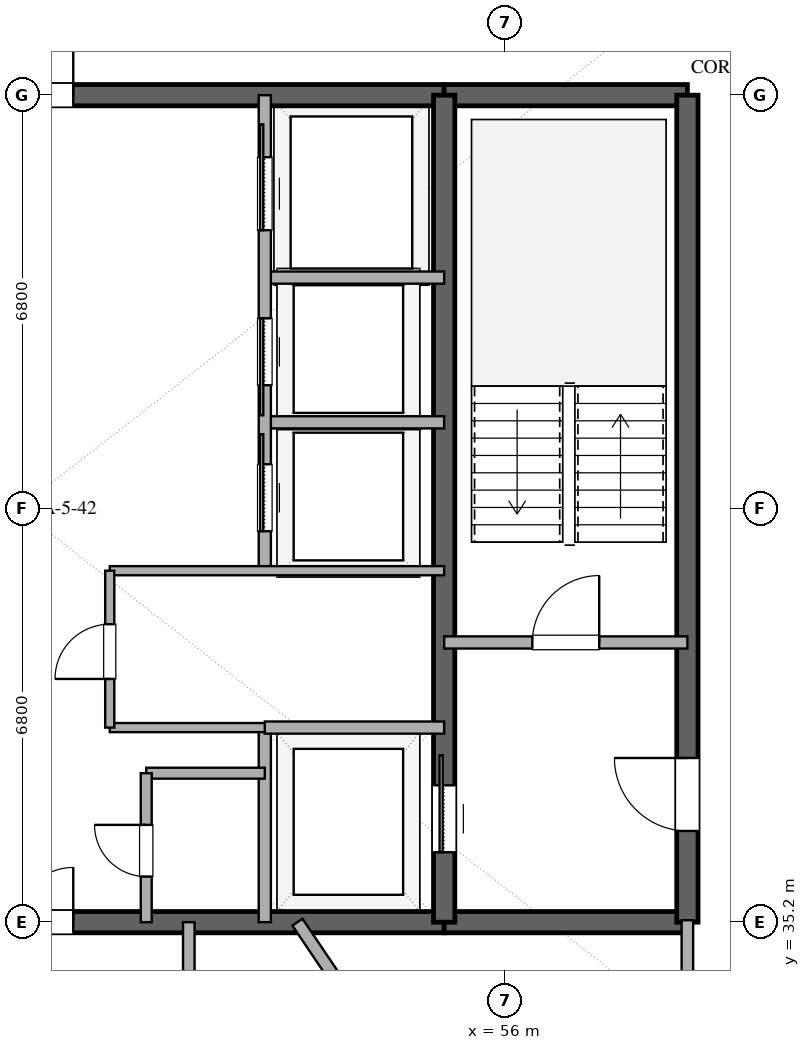
"""IFC4 building model, lengths in metres.
Left out: names, types, materials, properties, quantities, classifications, styles, units other than length and angle.
Written with IfcOpenShell. Run it as: python <this file> out.ifc"""

import sys

from ifc_helpers import new_model, si_unit, direction, frame, frame_2d, origin, place, context, subcontext, project, spatial, rectangle, extrude, element, fill, save


model = new_model("IFC4")
c1 = context("Model", 3, precision=1e-05, world=origin(), true_north=direction((0.0, 1.0)))
c2 = subcontext(c1, "Body", "Model", "MODEL_VIEW")
j1 = project(units=[si_unit("LENGTHUNIT", "METRE"), si_unit("PLANEANGLEUNIT", "RADIAN")], contexts=[c1])
p1 = place(None, origin())
s1 = spatial("IfcSite", under=j1, at=p1, CompositionType="ELEMENT")
p2 = place(p1, origin())
s2 = spatial("IfcBuilding", under=s1, at=p2, CompositionType="ELEMENT")
p3 = place(p2, frame((0.0, 0.0, 287.4)))
s3 = spatial("IfcBuildingStorey", under=s2, at=p3, CompositionType="ELEMENT", Elevation=287.4)
p4 = place(p3, frame((41.0, 35.2, 0.0), z_axis=(0.0, 0.0, 1.0), x_axis=(1.0, 0.0, 0.0)))
e1 = element("IfcWall", 1, at=p4, inside=s3, PredefinedType="SHEAR", context=c2, shape_type="SweptSolid", body=[
    extrude(rectangle(XDim=14.0, YDim=0.35, at=frame_2d((7.0, 0.0))), origin(), (0.0, 0.0, 1.0), 3.37),
])
p5 = place(p4, frame((6.1, 0.0, 0.0)))
e2 = element("IfcOpeningElement", 2, at=p5, cuts=e1, PredefinedType="OPENING", context=c2, shape_type="SweptSolid", body=[
    extrude(rectangle(XDim=1.8, YDim=2.25, at=frame_2d((0.9, 1.125))), frame((0.0, 0.185, 0.0), z_axis=(0.0, -1.0, 0.0), x_axis=(1.0, 0.0, 0.0)), (0.0, 0.0, 1.0), 0.37),
])
p6 = place(p3, frame((55.0, 35.2, 0.0), z_axis=(0.0, 0.0, 1.0), x_axis=(1.0, 0.0, 0.0)))
e3 = element("IfcWall", 3, at=p6, inside=s3, PredefinedType="SHEAR", context=c2, shape_type="SweptSolid", body=[
    extrude(rectangle(XDim=4.0, YDim=0.35, at=frame_2d((2.0, 0.0))), origin(), (0.0, 0.0, 1.0), 3.37),
])
p7 = place(p3, frame((41.0, 48.8, 0.0), z_axis=(0.0, 0.0, 1.0), x_axis=(1.0, 0.0, 0.0)))
e4 = element("IfcWall", 4, at=p7, inside=s3, PredefinedType="SHEAR", context=c2, shape_type="SweptSolid", body=[
    extrude(rectangle(XDim=14.0, YDim=0.35, at=frame_2d((7.0, 0.0))), origin(), (0.0, 0.0, 1.0), 3.37),
])
p8 = place(p7, frame((6.1, 0.0, 0.0)))
e5 = element("IfcOpeningElement", 5, at=p8, cuts=e4, PredefinedType="OPENING", context=c2, shape_type="SweptSolid", body=[
    extrude(rectangle(XDim=1.8, YDim=2.25, at=frame_2d((0.9, 1.125))), frame((0.0, 0.185, 0.0), z_axis=(0.0, -1.0, 0.0), x_axis=(1.0, 0.0, 0.0)), (0.0, 0.0, 1.0), 0.37),
])
p9 = place(p3, frame((55.0, 48.8, 0.0), z_axis=(0.0, 0.0, 1.0), x_axis=(1.0, 0.0, 0.0)))
e6 = element("IfcWall", 6, at=p9, inside=s3, PredefinedType="SHEAR", context=c2, shape_type="SweptSolid", body=[
    extrude(rectangle(XDim=4.0, YDim=0.35, at=frame_2d((2.0, 0.0))), origin(), (0.0, 0.0, 1.0), 3.37),
])
p10 = place(p3, frame((59.0, 35.2, 0.0), z_axis=(0.0, 0.0, 1.0), x_axis=(0.0, 1.0, 0.0)))
e7 = element("IfcWall", 7, at=p10, inside=s3, PredefinedType="SHEAR", context=c2, shape_type="SweptSolid", body=[
    extrude(rectangle(XDim=13.6, YDim=0.35, at=frame_2d((6.8, 0.0))), origin(), (0.0, 0.0, 1.0), 3.37),
])
p11 = place(p10, frame((1.5, 0.0, 0.0)))
e8 = element("IfcOpeningElement", 8, at=p11, cuts=e7, PredefinedType="OPENING", context=c2, shape_type="SweptSolid", body=[
    extrude(rectangle(XDim=1.2, YDim=2.15, at=frame_2d((0.6, 1.075))), frame((0.0, 0.185, 0.0), z_axis=(0.0, -1.0, 0.0), x_axis=(1.0, 0.0, 0.0)), (0.0, 0.0, 1.0), 0.37),
])
p12 = place(p3, frame((55.0, 35.2, 0.0), z_axis=(0.0, 0.0, 1.0), x_axis=(0.0, 1.0, 0.0)))
e9 = element("IfcWall", 9, at=p12, inside=s3, PredefinedType="SHEAR", context=c2, shape_type="SweptSolid", body=[
    extrude(rectangle(XDim=13.6, YDim=0.35, at=frame_2d((6.8, 0.0))), origin(), (0.0, 0.0, 1.0), 3.37),
])
p13 = place(p12, frame((1.15, 0.0, 0.0)))
e10 = element("IfcOpeningElement", 10, at=p13, cuts=e9, PredefinedType="OPENING", context=c2, shape_type="SweptSolid", body=[
    extrude(rectangle(XDim=1.1, YDim=2.2, at=frame_2d((0.55, 1.1))), frame((0.0, 0.185, 0.0), z_axis=(0.0, -1.0, 0.0), x_axis=(1.0, 0.0, 0.0)), (0.0, 0.0, 1.0), 0.37),
])
p14 = place(p3, frame((55.0, 39.8, 0.0), z_axis=(0.0, 0.0, 1.0), x_axis=(1.0, 0.0, 0.0)))
e11 = element("IfcWall", 11, at=p14, inside=s3, PredefinedType="SOLIDWALL", context=c2, shape_type="SweptSolid", body=[
    extrude(rectangle(XDim=4.0, YDim=0.2, at=frame_2d((2.0, 0.0))), origin(), (0.0, 0.0, 1.0), 2.73),
])
p15 = place(p14, frame((1.45, 0.0, 0.0)))
e12 = element("IfcOpeningElement", 12, at=p15, cuts=e11, PredefinedType="OPENING", context=c2, shape_type="SweptSolid", body=[
    extrude(rectangle(XDim=1.1, YDim=2.15, at=frame_2d((0.55, 1.075))), frame((0.0, 0.11, 0.0), z_axis=(0.0, -1.0, 0.0), x_axis=(1.0, 0.0, 0.0)), (0.0, 0.0, 1.0), 0.22),
])
p16 = place(p3, frame((52.05, 35.2, 0.0), z_axis=(0.0, 0.0, 1.0), x_axis=(0.0, 1.0, 0.0)))
e13 = element("IfcWall", 13, at=p16, inside=s3, PredefinedType="SOLIDWALL", context=c2, shape_type="SweptSolid", body=[
    extrude(rectangle(XDim=3.2, YDim=0.2, at=frame_2d((1.6, 0.0))), origin(), (0.0, 0.0, 1.0), 2.73),
])
for number, where, z_axis, x_axis in (
    (14, (52.05, 38.4, 0.0), (0.0, 0.0, 1.0), (1.0, 0.0, 0.0)),
    (15, (52.05, 43.42, 0.0), (0.0, 0.0, 1.0), (1.0, 0.0, 0.0)),
    (16, (52.05, 45.8, 0.0), (0.0, 0.0, 1.0), (1.0, 0.0, 0.0)),
):
    element("IfcWall", number, at=place(p3, frame(where, z_axis=z_axis, x_axis=x_axis)), inside=s3, PredefinedType="SOLIDWALL", context=c2, shape_type="SweptSolid", body=[
        extrude(rectangle(XDim=2.95, YDim=0.2, at=frame_2d((1.475, 0.0))), origin(), (0.0, 0.0, 1.0), 2.73),
    ])
p17 = place(p3, frame((52.05, 40.98, 0.0), z_axis=(0.0, 0.0, 1.0), x_axis=(0.0, 1.0, 0.0)))
e17 = element("IfcWall", 17, at=p17, inside=s3, PredefinedType="SOLIDWALL", context=c2, shape_type="SweptSolid", body=[
    extrude(rectangle(XDim=7.82, YDim=0.2, at=frame_2d((3.91, 0.0))), origin(), (0.0, 0.0, 1.0), 2.73),
])
p18 = place(p17, frame((0.65, 0.0, 0.0)))
e18 = element("IfcOpeningElement", 18, at=p18, cuts=e17, PredefinedType="OPENING", context=c2, shape_type="SweptSolid", body=[
    extrude(rectangle(XDim=1.1, YDim=2.2, at=frame_2d((0.55, 1.1))), frame((0.0, 0.11, 0.0), z_axis=(0.0, -1.0, 0.0), x_axis=(1.0, 0.0, 0.0)), (0.0, 0.0, 1.0), 0.22),
])
p19 = place(p17, frame((3.05, 0.0, 0.0)))
e19 = element("IfcOpeningElement", 19, at=p19, cuts=e17, PredefinedType="OPENING", context=c2, shape_type="SweptSolid", body=[
    extrude(rectangle(XDim=1.1, YDim=2.2, at=frame_2d((0.55, 1.1))), frame((0.0, 0.11, 0.0), z_axis=(0.0, -1.0, 0.0), x_axis=(1.0, 0.0, 0.0)), (0.0, 0.0, 1.0), 0.22),
])
p20 = place(p17, frame((5.6, 0.0, 0.0)))
e20 = element("IfcOpeningElement", 20, at=p20, cuts=e17, PredefinedType="OPENING", context=c2, shape_type="SweptSolid", body=[
    extrude(rectangle(XDim=1.2, YDim=2.2, at=frame_2d((0.6, 1.1))), frame((0.0, 0.11, 0.0), z_axis=(0.0, -1.0, 0.0), x_axis=(1.0, 0.0, 0.0)), (0.0, 0.0, 1.0), 0.22),
])
p21 = place(p3, frame((49.5, 40.98, 0.0), z_axis=(0.0, 0.0, 1.0), x_axis=(1.0, 0.0, 0.0)))
e21 = element("IfcWall", 21, at=p21, inside=s3, PredefinedType="PARTITIONING", context=c2, shape_type="SweptSolid", body=[
    extrude(rectangle(XDim=5.5, YDim=0.15, at=frame_2d((2.75, 0.0))), origin(), (0.0, 0.0, 1.0), 2.73),
])
p22 = place(p3, frame((49.5, 38.4, 0.0), z_axis=(0.0, 0.0, 1.0), x_axis=(1.0, 0.0, 0.0)))
e22 = element("IfcWall", 22, at=p22, inside=s3, PredefinedType="PARTITIONING", context=c2, shape_type="SweptSolid", body=[
    extrude(rectangle(XDim=2.55, YDim=0.15, at=frame_2d((1.275, 0.0))), origin(), (0.0, 0.0, 1.0), 2.73),
])
p23 = place(p3, frame((49.5, 38.4, 0.0), z_axis=(0.0, 0.0, 1.0), x_axis=(0.0, 1.0, 0.0)))
e23 = element("IfcWall", 23, at=p23, inside=s3, PredefinedType="PARTITIONING", context=c2, shape_type="SweptSolid", body=[
    extrude(rectangle(XDim=2.58, YDim=0.15, at=frame_2d((1.29, 0.0))), origin(), (0.0, 0.0, 1.0), 2.73),
])
p24 = place(p23, frame((0.8, 0.0, 0.0)))
e24 = element("IfcOpeningElement", 24, at=p24, cuts=e23, PredefinedType="OPENING", context=c2, shape_type="SweptSolid", body=[
    extrude(rectangle(XDim=0.9, YDim=2.15, at=frame_2d((0.45, 1.075))), frame((0.0, 0.085, 0.0), z_axis=(0.0, -1.0, 0.0), x_axis=(1.0, 0.0, 0.0)), (0.0, 0.0, 1.0), 0.17),
])
p25 = place(p3, frame((50.1, 37.65, 0.0), z_axis=(0.0, 0.0, 1.0), x_axis=(1.0, 0.0, 0.0)))
e25 = element("IfcWall", 25, at=p25, inside=s3, PredefinedType="PLUMBINGWALL", context=c2, shape_type="SweptSolid", body=[
    extrude(rectangle(XDim=1.95, YDim=0.18, at=frame_2d((0.975, 0.0))), origin(), (0.0, 0.0, 1.0), 2.73),
])
p26 = place(p3, frame((50.1, 35.2, 0.0), z_axis=(0.0, 0.0, 1.0), x_axis=(0.0, 1.0, 0.0)))
e26 = element("IfcWall", 26, at=p26, inside=s3, PredefinedType="PLUMBINGWALL", context=c2, shape_type="SweptSolid", body=[
    extrude(rectangle(XDim=2.45, YDim=0.18, at=frame_2d((1.225, 0.0))), origin(), (0.0, 0.0, 1.0), 2.73),
])
p27 = place(p26, frame((0.75, 0.0, 0.0)))
e27 = element("IfcOpeningElement", 27, at=p27, cuts=e26, PredefinedType="OPENING", context=c2, shape_type="SweptSolid", body=[
    extrude(rectangle(XDim=0.85, YDim=2.1, at=frame_2d((0.425, 1.05))), frame((0.0, 0.1, 0.0), z_axis=(0.0, -1.0, 0.0), x_axis=(1.0, 0.0, 0.0)), (0.0, 0.0, 1.0), 0.2),
])
p28 = place(p3, frame((54.97, 31.667, 0.0), z_axis=(0.0, 0.0, 1.0), x_axis=(-0.559200276542, 0.829032599308, 0.0)))
e28 = element("IfcWall", 28, at=p28, inside=s3, PredefinedType="PARTITIONING", context=c2, shape_type="SweptSolid", body=[
    extrude(rectangle(XDim=4.261, YDim=0.2, at=frame_2d((2.131, 0.0))), origin(), (0.0, 0.0, 1.0), 2.73),
])
p29 = place(p3, frame((50.8, 35.2, 0.0), z_axis=(0.0, 0.0, 1.0), x_axis=(0.0, -1.0, 0.0)))
e29 = element("IfcWall", 29, at=p29, inside=s3, PredefinedType="PARTITIONING", context=c2, shape_type="SweptSolid", body=[
    extrude(rectangle(XDim=2.1, YDim=0.19, at=frame_2d((1.05, 0.0))), origin(), (0.0, 0.0, 1.0), 2.73),
])
p30 = place(p3, frame((59.0, 34.0, 0.0), z_axis=(0.0, 0.0, 1.0), x_axis=(0.0, 1.0, 0.0)))
e30 = element("IfcWall", 30, at=p30, inside=s3, PredefinedType="PARTITIONING", context=c2, shape_type="SweptSolid", body=[
    extrude(rectangle(XDim=1.232, YDim=0.19, at=frame_2d((0.616, 0.0))), origin(), (0.0, 0.0, 1.0), 2.73),
])
p31 = place(p13, origin())
e31 = element("IfcDoor", 31, at=p31, inside=s3, OperationType="SLIDING_TO_RIGHT", PredefinedType="DOOR", context=c2, shape_type="SweptSolid", body=[
    extrude(rectangle(XDim=1.1, YDim=2.2, at=frame_2d((0.55, 1.1))), frame((0.0, 0.025, 0.0), z_axis=(0.0, -1.0, 0.0), x_axis=(1.0, 0.0, 0.0)), (0.0, 0.0, 1.0), 0.05),
])
fill(e10, e31)
p32 = place(p11, origin())
e32 = element("IfcDoor", 32, at=p32, inside=s3, OperationType="SINGLE_SWING_RIGHT", PredefinedType="DOOR", context=c2, shape_type="SweptSolid", body=[
    extrude(rectangle(XDim=1.2, YDim=2.15, at=frame_2d((0.6, 1.075))), frame((0.0, 0.025, 0.0), z_axis=(0.0, -1.0, 0.0), x_axis=(1.0, 0.0, 0.0)), (0.0, 0.0, 1.0), 0.05),
])
fill(e8, e32)
p33 = place(p5, origin())
e33 = element("IfcDoor", 33, at=p33, inside=s3, OperationType="DOUBLE_DOOR_SINGLE_SWING", PredefinedType="DOOR", context=c2, shape_type="SweptSolid", body=[
    extrude(rectangle(XDim=1.8, YDim=2.25, at=frame_2d((0.9, 1.125))), frame((0.0, 0.025, 0.0), z_axis=(0.0, -1.0, 0.0), x_axis=(1.0, 0.0, 0.0)), (0.0, 0.0, 1.0), 0.05),
])
fill(e2, e33)
p34 = place(p8, origin())
e34 = element("IfcDoor", 34, at=p34, inside=s3, OperationType="DOUBLE_DOOR_SINGLE_SWING", PredefinedType="DOOR", context=c2, shape_type="SweptSolid", body=[
    extrude(rectangle(XDim=1.8, YDim=2.25, at=frame_2d((0.9, 1.125))), frame((0.0, 0.025, 0.0), z_axis=(0.0, -1.0, 0.0), x_axis=(1.0, 0.0, 0.0)), (0.0, 0.0, 1.0), 0.05),
])
fill(e5, e34)
p35 = place(p15, origin())
e35 = element("IfcDoor", 35, at=p35, inside=s3, OperationType="SINGLE_SWING_RIGHT", PredefinedType="DOOR", context=c2, shape_type="SweptSolid", body=[
    extrude(rectangle(XDim=1.1, YDim=2.15, at=frame_2d((0.55, 1.075))), frame((0.0, 0.025, 0.0), z_axis=(0.0, -1.0, 0.0), x_axis=(1.0, 0.0, 0.0)), (0.0, 0.0, 1.0), 0.05),
])
fill(e12, e35)
p36 = place(p18, origin())
e36 = element("IfcDoor", 36, at=p36, inside=s3, OperationType="SLIDING_TO_RIGHT", PredefinedType="DOOR", context=c2, shape_type="SweptSolid", body=[
    extrude(rectangle(XDim=1.1, YDim=2.2, at=frame_2d((0.55, 1.1))), frame((0.0, 0.025, 0.0), z_axis=(0.0, -1.0, 0.0), x_axis=(1.0, 0.0, 0.0)), (0.0, 0.0, 1.0), 0.05),
])
fill(e18, e36)
p37 = place(p19, origin())
e37 = element("IfcDoor", 37, at=p37, inside=s3, OperationType="SLIDING_TO_LEFT", PredefinedType="DOOR", context=c2, shape_type="SweptSolid", body=[
    extrude(rectangle(XDim=1.1, YDim=2.2, at=frame_2d((0.55, 1.1))), frame((0.0, 0.025, 0.0), z_axis=(0.0, -1.0, 0.0), x_axis=(1.0, 0.0, 0.0)), (0.0, 0.0, 1.0), 0.05),
])
fill(e19, e37)
p38 = place(p20, origin())
e38 = element("IfcDoor", 38, at=p38, inside=s3, OperationType="SLIDING_TO_RIGHT", PredefinedType="DOOR", context=c2, shape_type="SweptSolid", body=[
    extrude(rectangle(XDim=1.2, YDim=2.2, at=frame_2d((0.6, 1.1))), frame((0.0, 0.025, 0.0), z_axis=(0.0, -1.0, 0.0), x_axis=(1.0, 0.0, 0.0)), (0.0, 0.0, 1.0), 0.05),
])
fill(e20, e38)
p39 = place(p24, origin())
e39 = element("IfcDoor", 39, at=p39, inside=s3, OperationType="SINGLE_SWING_LEFT", PredefinedType="DOOR", context=c2, shape_type="SweptSolid", body=[
    extrude(rectangle(XDim=0.9, YDim=2.15, at=frame_2d((0.45, 1.075))), frame((0.0, 0.025, 0.0), z_axis=(0.0, -1.0, 0.0), x_axis=(1.0, 0.0, 0.0)), (0.0, 0.0, 1.0), 0.05),
])
fill(e24, e39)
p40 = place(p27, origin())
e40 = element("IfcDoor", 40, at=p40, inside=s3, OperationType="SINGLE_SWING_RIGHT", PredefinedType="DOOR", context=c2, shape_type="SweptSolid", body=[
    extrude(rectangle(XDim=0.85, YDim=2.1, at=frame_2d((0.425, 1.05))), frame((0.0, 0.025, 0.0), z_axis=(0.0, -1.0, 0.0), x_axis=(1.0, 0.0, 0.0)), (0.0, 0.0, 1.0), 0.05),
])
fill(e27, e40)
save(model, sys.argv[1])
